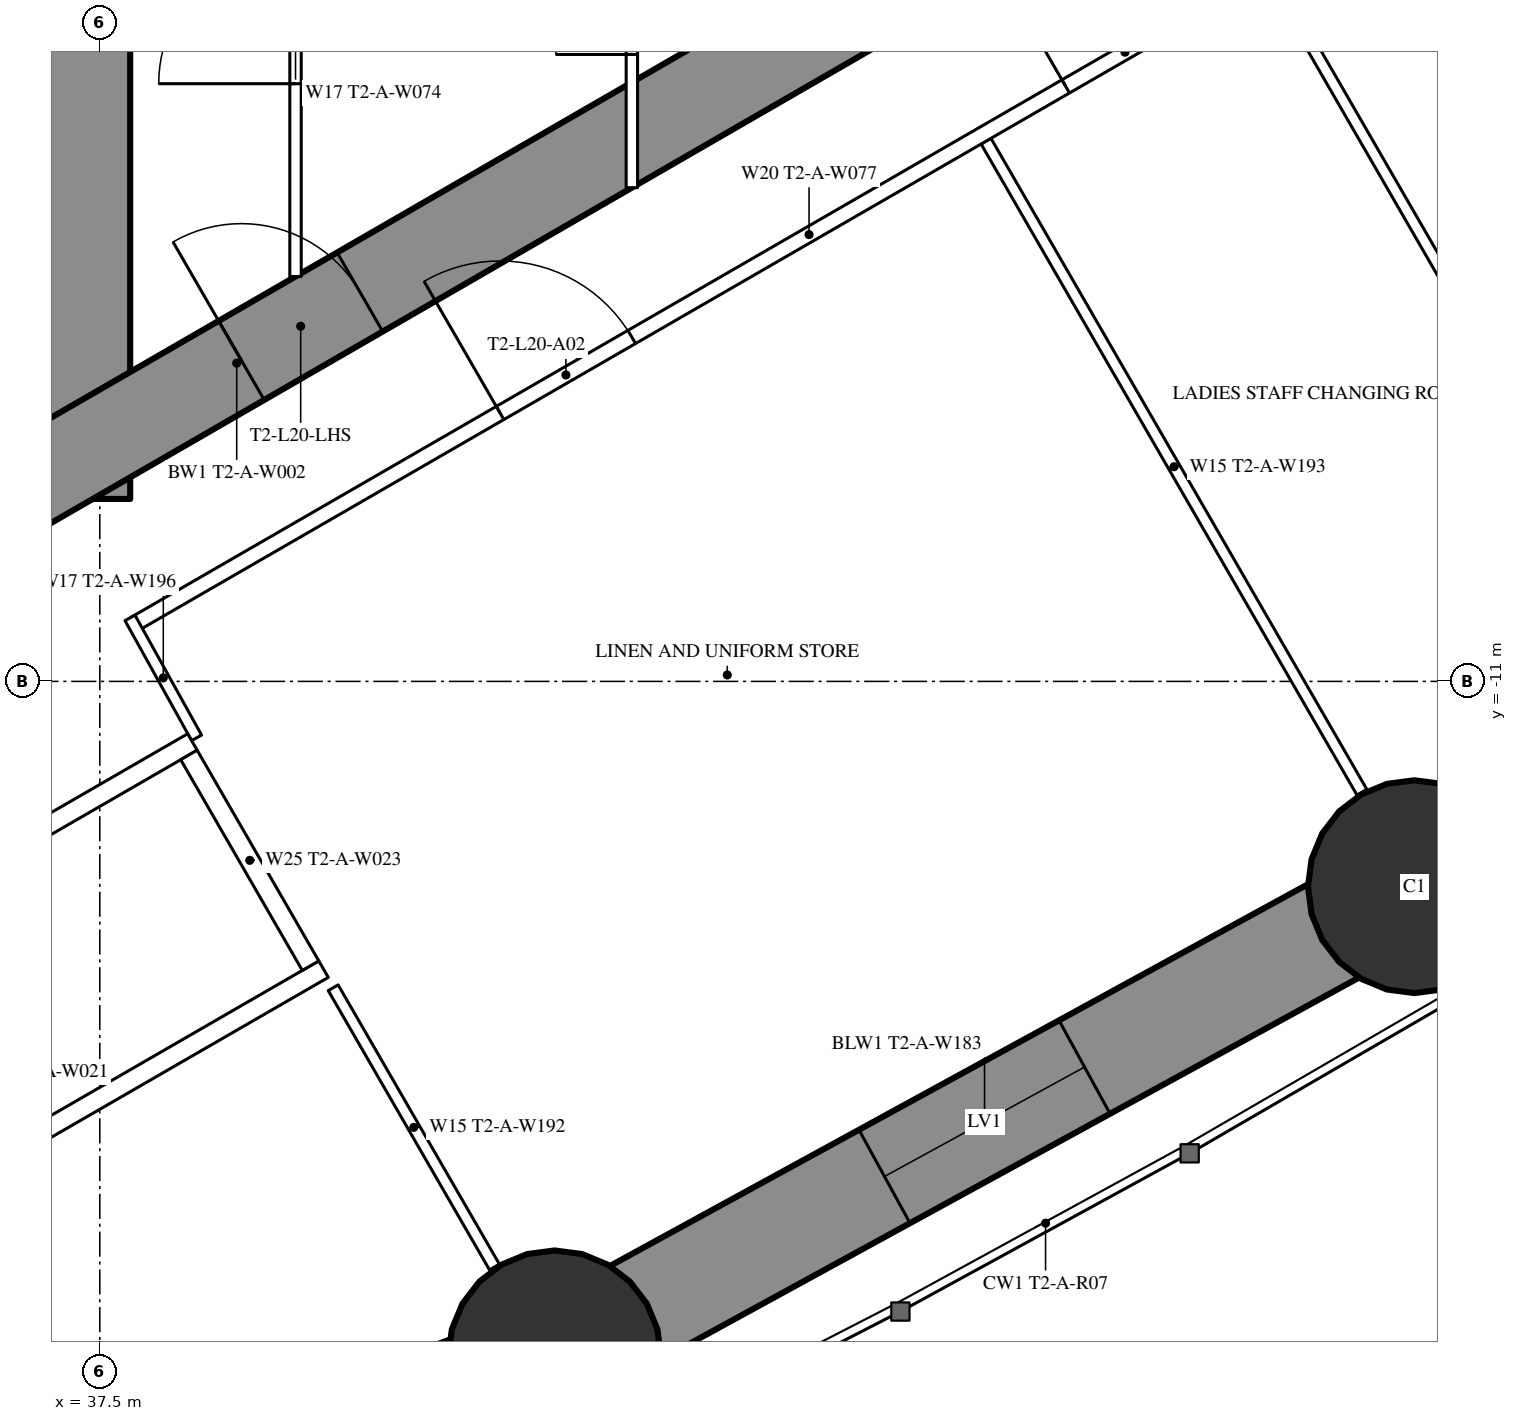
"""IFC4 building model, lengths in metres.
Left out: names, types, materials, properties, quantities, classifications, styles, units other than length and angle.
Written with IfcOpenShell. Run it as: python <this file> out.ifc"""

import sys

from ifc_helpers import new_model, si_unit, direction, frame, frame_2d, origin, origin_2d, place, context, subcontext, project, spatial, rectangle, hollow_circle, extrude, element, fill, save


model = new_model("IFC4")
c1 = context("Model", 3, precision=1e-05, world=origin(), true_north=direction((0.0, 1.0)))
c2 = subcontext(c1, "Body", "Model", "MODEL_VIEW")
j1 = project(units=[si_unit("LENGTHUNIT", "METRE"), si_unit("PLANEANGLEUNIT", "RADIAN")], contexts=[c1])
p1 = place(None, origin())
s1 = spatial("IfcSite", under=j1, at=p1, CompositionType="ELEMENT")
p2 = place(p1, origin())
s2 = spatial("IfcBuilding", under=s1, at=p2, CompositionType="ELEMENT")
p3 = place(p2, frame((0.0, 0.0, 77.5)))
s3 = spatial("IfcBuildingStorey", under=s2, at=p3, CompositionType="ELEMENT", Elevation=77.5)
for number, where, z_axis, x_axis in (
    (1, (43.484, -19.886, 0.0), (0.0, 0.0, 1.0), (1.0, 0.0, 0.0)),
    (2, (54.795, -13.701, 0.0), (0.0, 0.0, 1.0), (1.0, 0.0, 0.0)),
):
    element("IfcColumn", number, at=place(p3, frame(where, z_axis=z_axis, x_axis=x_axis)), inside=s3, PredefinedType="COLUMN", context=c2, shape_type="SweptSolid", body=[
        extrude(hollow_circle(Radius=1.4, WallThickness=0.12, at=origin_2d()), origin(), (0.0, 0.0, 1.0), 3.5),
    ])
p4 = place(p3, frame((37.3, -8.6, 0.0), z_axis=(0.0, 0.0, 1.0), x_axis=(0.0, 1.0, 0.0)))
e3 = element("IfcWall", 3, at=p4, inside=s3, PredefinedType="SHEAR", context=c2, shape_type="SweptSolid", body=[
    extrude(rectangle(XDim=17.2, YDim=1.2, at=frame_2d((8.6, 0.0))), origin(), (0.0, 0.0, 1.0), 3.5),
])
p5 = place(p4, frame((7.7, 0.0, 0.0)))
e4 = element("IfcOpeningElement", 4, at=p5, cuts=e3, PredefinedType="OPENING", context=c2, shape_type="SweptSolid", body=[
    extrude(rectangle(XDim=1.8, YDim=2.2, at=frame_2d((0.9, 1.1))), frame((0.0, 0.61, 0.0), z_axis=(0.0, -1.0, 0.0), x_axis=(1.0, 0.0, 0.0)), (0.0, 0.0, 1.0), 1.22),
])
p6 = place(p3, frame((27.2, -13.8, 0.0), z_axis=(0.0, 0.0, 1.0), x_axis=(0.866027159892, 0.499996958321, 0.0)))
e5 = element("IfcWall", 5, at=p6, inside=s3, PredefinedType="SHEAR", context=c2, shape_type="SweptSolid", body=[
    extrude(rectangle(XDim=27.947, YDim=1.2, at=frame_2d((13.973, 0.0))), origin(), (0.0, 0.0, 1.0), 3.5),
])
p7 = place(p6, frame((5.65, 0.0, 0.0)))
e6 = element("IfcOpeningElement", 6, at=p7, cuts=e5, PredefinedType="OPENING", context=c2, shape_type="SweptSolid", body=[
    extrude(rectangle(XDim=1.0, YDim=2.2, at=frame_2d((0.5, 1.1))), frame((0.0, 0.61, 0.0), z_axis=(0.0, -1.0, 0.0), x_axis=(1.0, 0.0, 0.0)), (0.0, 0.0, 1.0), 1.22),
])
p8 = place(p6, frame((14.045, 0.0, 0.0)))
e7 = element("IfcOpeningElement", 7, at=p8, cuts=e5, PredefinedType="OPENING", context=c2, shape_type="SweptSolid", body=[
    extrude(rectangle(XDim=1.8, YDim=2.2, at=frame_2d((0.9, 1.1))), frame((0.0, 0.61, 0.0), z_axis=(0.0, -1.0, 0.0), x_axis=(1.0, 0.0, 0.0)), (0.0, 0.0, 1.0), 1.22),
])
p9 = place(p3, frame((29.911, -25.002, 0.0), z_axis=(0.0, 0.0, 1.0), x_axis=(0.935736448066, 0.352700013836, 0.0)))
e8 = element("IfcWall", 8, at=p9, inside=s3, PredefinedType="SHEAR", context=c2, shape_type="SweptSolid", body=[
    extrude(rectangle(XDim=14.505, YDim=1.4, at=frame_2d((7.252, 0.0))), origin(), (0.0, 0.0, 1.0), 3.5),
])
p10 = place(p9, frame((5.752, 0.0, 0.6)))
e9 = element("IfcOpeningElement", 9, at=p10, cuts=e8, PredefinedType="OPENING", context=c2, shape_type="SweptSolid", body=[
    extrude(rectangle(XDim=3.0, YDim=1.2, at=frame_2d((1.5, 0.6))), frame((0.0, 0.71, 0.0), z_axis=(0.0, -1.0, 0.0), x_axis=(1.0, 0.0, 0.0)), (0.0, 0.0, 1.0), 1.42),
])
p11 = place(p3, frame((43.484, -19.886, 0.0), z_axis=(0.0, 0.0, 1.0), x_axis=(0.87736889738, 0.479816441893, 0.0)))
e10 = element("IfcWall", 10, at=p11, inside=s3, PredefinedType="SHEAR", context=c2, shape_type="SweptSolid", body=[
    extrude(rectangle(XDim=12.892, YDim=1.4, at=frame_2d((6.446, 0.0))), origin(), (0.0, 0.0, 1.0), 3.5),
])
p12 = place(p11, frame((4.946, 0.0, 0.6)))
e11 = element("IfcOpeningElement", 11, at=p12, cuts=e10, PredefinedType="OPENING", context=c2, shape_type="SweptSolid", body=[
    extrude(rectangle(XDim=3.0, YDim=1.2, at=frame_2d((1.5, 0.6))), frame((0.0, 0.71, 0.0), z_axis=(0.0, -1.0, 0.0), x_axis=(1.0, 0.0, 0.0)), (0.0, 0.0, 1.0), 1.42),
])
p13 = place(p3, frame((54.795, -13.701, 0.0), z_axis=(0.0, 0.0, 1.0), x_axis=(0.845078312276, 0.534642540508, 0.0)))
e12 = element("IfcWall", 12, at=p13, inside=s3, PredefinedType="SHEAR", context=c2, shape_type="SweptSolid", body=[
    extrude(rectangle(XDim=8.596, YDim=1.4, at=frame_2d((4.298, 0.0))), origin(), (0.0, 0.0, 1.0), 3.5),
])
p14 = place(p13, frame((2.798, 0.0, 0.6)))
e13 = element("IfcOpeningElement", 13, at=p14, cuts=e12, PredefinedType="OPENING", context=c2, shape_type="SweptSolid", body=[
    extrude(rectangle(XDim=3.0, YDim=1.2, at=frame_2d((1.5, 0.6))), frame((0.0, 0.71, 0.0), z_axis=(0.0, -1.0, 0.0), x_axis=(1.0, 0.0, 0.0)), (0.0, 0.0, 1.0), 1.42),
])
p15 = place(p3, frame((49.159, -3.893, 0.0), z_axis=(0.0, 0.0, 1.0), x_axis=(0.499998773722, -0.866026111775, 0.0)))
e14 = element("IfcWall", 14, at=p15, inside=s3, PredefinedType="PARTITIONING", context=c2, shape_type="SweptSolid", body=[
    extrude(rectangle(XDim=9.892, YDim=0.15, at=frame_2d((4.946, 0.0))), origin(), (0.0, 0.0, 1.0), 2.05),
])
p16 = place(p3, frame((52.915, -1.725, 0.0), z_axis=(0.0, 0.0, 1.0), x_axis=(0.499991830914, -0.866030120157, 0.0)))
e15 = element("IfcWall", 15, at=p16, inside=s3, PredefinedType="PARTITIONING", context=c2, shape_type="SweptSolid", body=[
    extrude(rectangle(XDim=10.434, YDim=0.15, at=frame_2d((5.217, 0.0))), origin(), (0.0, 0.0, 1.0), 3.25),
])
p17 = place(p3, frame((40.57, -15.03, 0.0), z_axis=(0.0, 0.0, 1.0), x_axis=(0.500012993597, -0.866017901798, 0.0)))
e16 = element("IfcWall", 16, at=p17, inside=s3, PredefinedType="PARTITIONING", context=c2, shape_type="SweptSolid", body=[
    extrude(rectangle(XDim=4.243, YDim=0.15, at=frame_2d((2.122, 0.0))), origin(), (0.0, 0.0, 1.0), 3.25),
])
p18 = place(p3, frame((37.96, -10.243, 0.0), z_axis=(0.0, 0.0, 1.0), x_axis=(0.866026429433, 0.499998223521, 0.0)))
e17 = element("IfcWall", 17, at=p18, inside=s3, PredefinedType="PARTITIONING", context=c2, shape_type="SweptSolid", body=[
    extrude(rectangle(XDim=20.487, YDim=0.2, at=frame_2d((10.243, 0.0))), origin(), (0.0, 0.0, 1.0), 3.25),
])
p19 = place(p18, frame((14.142, 0.0, 0.0)))
e18 = element("IfcOpeningElement", 18, at=p19, cuts=e17, PredefinedType="OPENING", context=c2, shape_type="SweptSolid", body=[
    extrude(rectangle(XDim=1.8, YDim=2.2, at=frame_2d((0.9, 1.1))), frame((0.0, 0.11, 0.0), z_axis=(0.0, -1.0, 0.0), x_axis=(1.0, 0.0, 0.0)), (0.0, 0.0, 1.0), 0.22),
])
p20 = place(p18, frame((17.836, 0.0, 0.0)))
e19 = element("IfcOpeningElement", 19, at=p20, cuts=e17, PredefinedType="OPENING", context=c2, shape_type="SweptSolid", body=[
    extrude(rectangle(XDim=1.8, YDim=2.04, at=frame_2d((0.9, 1.02))), frame((0.0, 0.11, 0.0), z_axis=(0.0, -1.0, 0.0), x_axis=(1.0, 0.0, 0.0)), (0.0, 0.0, 1.0), 0.22),
])
p21 = place(p18, frame((5.55, 0.0, 0.0)))
e20 = element("IfcOpeningElement", 20, at=p21, cuts=e17, PredefinedType="OPENING", context=c2, shape_type="SweptSolid", body=[
    extrude(rectangle(XDim=2.0, YDim=2.4, at=frame_2d((1.0, 1.2))), frame((0.0, 0.11, 0.0), z_axis=(0.0, -1.0, 0.0), x_axis=(1.0, 0.0, 0.0)), (0.0, 0.0, 1.0), 0.22),
])
p22 = place(p3, frame((38.773, -11.742, 0.0), z_axis=(0.0, 0.0, 1.0), x_axis=(-0.485528096672, 0.8742210632, 0.0)))
e21 = element("IfcWall", 21, at=p22, inside=s3, PredefinedType="PARTITIONING", context=c2, shape_type="SweptSolid", body=[
    extrude(rectangle(XDim=1.805, YDim=0.15, at=frame_2d((0.903, 0.0))), origin(), (0.0, 0.0, 1.0), 3.25),
])
p23 = place(p3, frame((40.075, -5.674, 0.0), z_axis=(0.0, 0.0, 1.0), x_axis=(0.0, 1.0, 0.0)))
e22 = element("IfcWall", 22, at=p23, inside=s3, PredefinedType="PARTITIONING", context=c2, shape_type="SweptSolid", body=[
    extrude(rectangle(XDim=6.874, YDim=0.15, at=frame_2d((3.437, 0.0))), origin(), (0.0, 0.0, 1.0), 3.25),
])
p24 = place(p23, frame((2.537, 0.0, 0.0)))
e23 = element("IfcOpeningElement", 23, at=p24, cuts=e22, PredefinedType="OPENING", context=c2, shape_type="SweptSolid", body=[
    extrude(rectangle(XDim=1.8, YDim=2.2, at=frame_2d((0.9, 1.1))), frame((0.0, 0.085, 0.0), z_axis=(0.0, -1.0, 0.0), x_axis=(1.0, 0.0, 0.0)), (0.0, 0.0, 1.0), 0.17),
])
p25 = place(p3, frame((44.5, -4.505, 0.0), z_axis=(0.0, 0.0, 1.0), x_axis=(0.0, 1.0, 0.0)))
e24 = element("IfcWall", 24, at=p25, inside=s3, PredefinedType="PARTITIONING", context=c2, shape_type="SweptSolid", body=[
    extrude(rectangle(XDim=9.009, YDim=0.15, at=frame_2d((4.505, 0.0))), origin(), (0.0, 0.0, 1.0), 3.25),
])
p26 = place(p25, frame((1.752, 0.0, 0.0)))
e25 = element("IfcOpeningElement", 25, at=p26, cuts=e24, PredefinedType="OPENING", context=c2, shape_type="SweptSolid", body=[
    extrude(rectangle(XDim=1.0, YDim=2.2, at=frame_2d((0.5, 1.1))), frame((0.0, 0.085, 0.0), z_axis=(0.0, -1.0, 0.0), x_axis=(1.0, 0.0, 0.0)), (0.0, 0.0, 1.0), 0.17),
])
p27 = place(p25, frame((6.257, 0.0, 0.0)))
e26 = element("IfcOpeningElement", 26, at=p27, cuts=e24, PredefinedType="OPENING", context=c2, shape_type="SweptSolid", body=[
    extrude(rectangle(XDim=1.0, YDim=2.2, at=frame_2d((0.5, 1.1))), frame((0.0, 0.085, 0.0), z_axis=(0.0, -1.0, 0.0), x_axis=(1.0, 0.0, 0.0)), (0.0, 0.0, 1.0), 0.17),
])
for number, where, z_axis, x_axis in (
    (27, (31.271, -16.097, 0.0), (0.0, 0.0, 1.0), (0.866, 0.5, 0.0)),
    (28, (32.996, -19.086, 0.0), (0.0, 0.0, 1.0), (0.866, 0.5, 0.0)),
):
    element("IfcWall", number, at=place(p3, frame(where, z_axis=z_axis, x_axis=x_axis)), inside=s3, PredefinedType="PARTITIONING", context=c2, shape_type="SweptSolid", body=[
        extrude(rectangle(XDim=8.6, YDim=0.25, at=frame_2d((4.3, 0.0))), origin(), (0.0, 0.0, 1.0), 3.25),
    ])
p28 = place(p3, frame((38.673, -11.968, 0.0), z_axis=(0.0, 0.0, 1.0), x_axis=(0.499929347863, -0.866066190972, 0.0)))
e29 = element("IfcWall", 29, at=p28, inside=s3, PredefinedType="PARTITIONING", context=c2, shape_type="SweptSolid", body=[
    extrude(rectangle(XDim=3.201, YDim=0.25, at=frame_2d((1.6, 0.0))), origin(), (0.0, 0.0, 1.0), 3.25),
])
p29 = place(p12, origin())
e30 = element("IfcWindow", 30, at=p29, inside=s3, PartitioningType="SINGLE_PANEL", PredefinedType="WINDOW", context=c2, shape_type="SweptSolid", body=[
    extrude(rectangle(XDim=3.0, YDim=1.2, at=frame_2d((1.5, 0.6))), frame((0.0, 0.03, 0.0), z_axis=(0.0, -1.0, 0.0), x_axis=(1.0, 0.0, 0.0)), (0.0, 0.0, 1.0), 0.06),
])
fill(e11, e30)
p30 = place(p19, origin())
e31 = element("IfcDoor", 31, at=p30, inside=s3, OperationType="DOUBLE_DOOR_SINGLE_SWING", PredefinedType="DOOR", context=c2, shape_type="SweptSolid", body=[
    extrude(rectangle(XDim=1.8, YDim=2.2, at=frame_2d((0.9, 1.1))), frame((0.0, 0.025, 0.0), z_axis=(0.0, -1.0, 0.0), x_axis=(1.0, 0.0, 0.0)), (0.0, 0.0, 1.0), 0.05),
])
fill(e18, e31)
p31 = place(p21, origin())
e32 = element("IfcDoor", 32, at=p31, inside=s3, OperationType="DOUBLE_DOOR_SINGLE_SWING", PredefinedType="DOOR", context=c2, shape_type="SweptSolid", body=[
    extrude(rectangle(XDim=2.0, YDim=2.4, at=frame_2d((1.0, 1.2))), frame((0.0, 0.025, 0.0), z_axis=(0.0, -1.0, 0.0), x_axis=(1.0, 0.0, 0.0)), (0.0, 0.0, 1.0), 0.05),
])
fill(e20, e32)
p32 = place(p24, origin())
e33 = element("IfcDoor", 33, at=p32, inside=s3, OperationType="DOUBLE_DOOR_SINGLE_SWING", PredefinedType="DOOR", context=c2, shape_type="SweptSolid", body=[
    extrude(rectangle(XDim=1.8, YDim=2.2, at=frame_2d((0.9, 1.1))), frame((0.0, 0.025, 0.0), z_axis=(0.0, -1.0, 0.0), x_axis=(1.0, 0.0, 0.0)), (0.0, 0.0, 1.0), 0.05),
])
fill(e23, e33)
p33 = place(p26, origin())
e34 = element("IfcDoor", 34, at=p33, inside=s3, OperationType="SINGLE_SWING_LEFT", PredefinedType="DOOR", context=c2, shape_type="SweptSolid", body=[
    extrude(rectangle(XDim=1.0, YDim=2.2, at=frame_2d((0.5, 1.1))), frame((0.0, 0.025, 0.0), z_axis=(0.0, -1.0, 0.0), x_axis=(1.0, 0.0, 0.0)), (0.0, 0.0, 1.0), 0.05),
])
fill(e25, e34)
p34 = place(p8, origin())
e35 = element("IfcDoor", 35, at=p34, inside=s3, OperationType="DOUBLE_DOOR_SINGLE_SWING", PredefinedType="DOOR", context=c2, shape_type="SweptSolid", body=[
    extrude(rectangle(XDim=1.8, YDim=2.2, at=frame_2d((0.9, 1.1))), frame((0.0, 0.025, 0.0), z_axis=(0.0, -1.0, 0.0), x_axis=(1.0, 0.0, 0.0)), (0.0, 0.0, 1.0), 0.05),
])
fill(e7, e35)
save(model, sys.argv[1])
